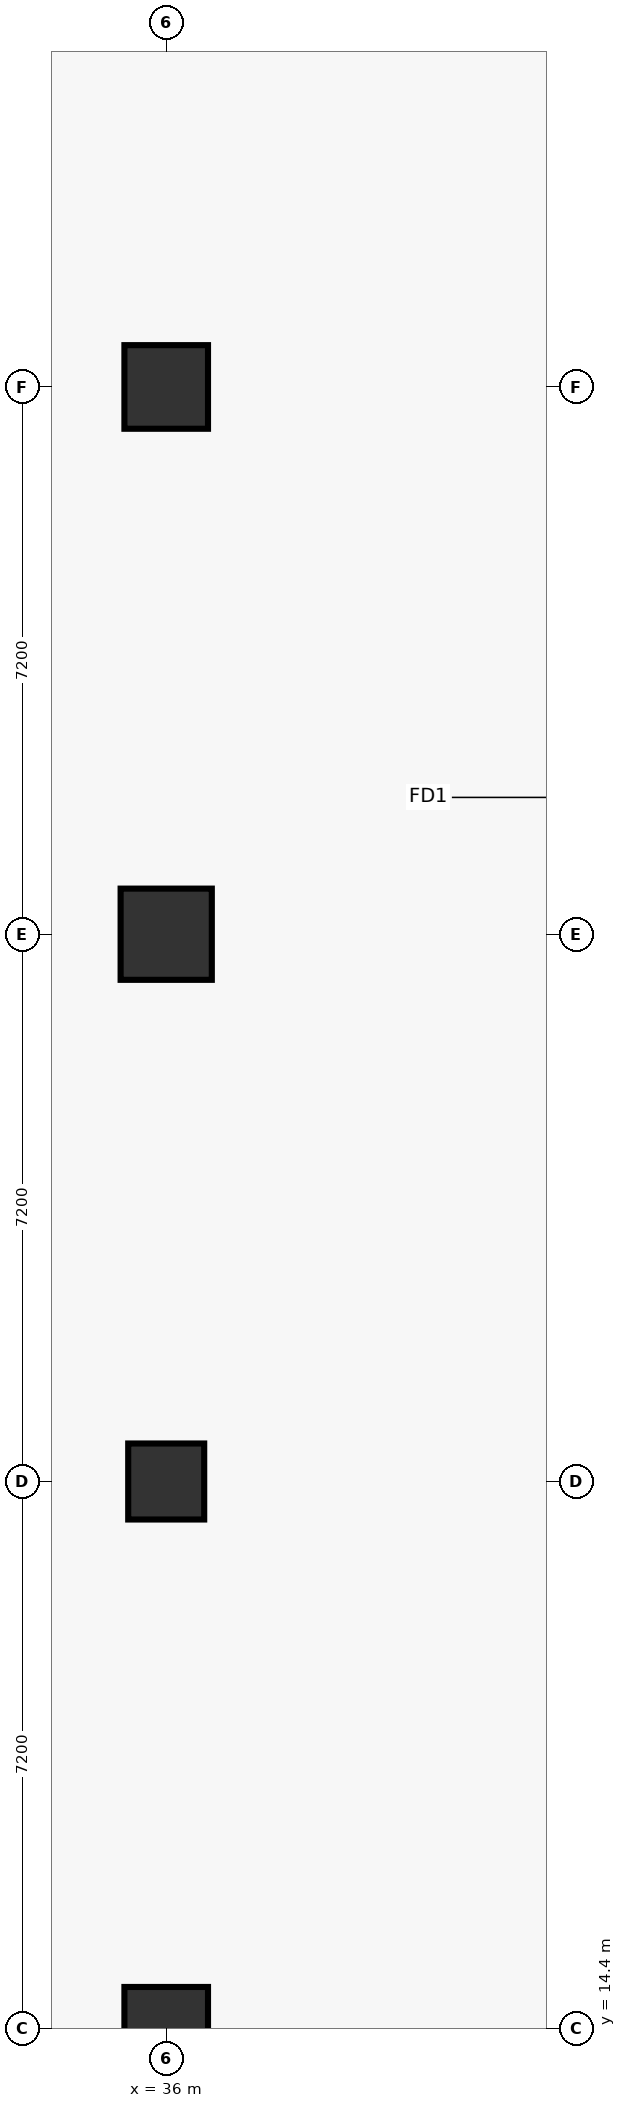
"""IFC4 building model, lengths in metres.
Left out: names, types, materials, properties, quantities, classifications, styles, units other than length and angle.
Written with IfcOpenShell. Run it as: python <this file> out.ifc"""

import sys

from ifc_helpers import new_model, si_unit, direction, frame, origin, origin_2d, place, context, subcontext, project, spatial, rectangle, circle, extrude, element, save


model = new_model("IFC4")
c1 = context("Model", 3, precision=1e-05, world=origin(), true_north=direction((0.0, 1.0)))
c2 = subcontext(c1, "Body", "Model", "MODEL_VIEW")
j1 = project(units=[si_unit("LENGTHUNIT", "METRE"), si_unit("PLANEANGLEUNIT", "RADIAN")], contexts=[c1])
p1 = place(None, origin())
s1 = spatial("IfcSite", under=j1, at=p1, CompositionType="ELEMENT")
p2 = place(p1, origin())
s2 = spatial("IfcBuilding", under=s1, at=p2, CompositionType="ELEMENT")
p3 = place(p2, frame((0.0, 0.0, -5.4)))
s3 = spatial("IfcBuildingStorey", under=s2, at=p3, CompositionType="ELEMENT", Elevation=-5.4)
p4 = place(p3, frame((36.0, 14.4, 0.0), z_axis=(0.0, 0.0, 1.0), x_axis=(1.0, 0.0, 0.0)))
e1 = element("IfcColumn", 1, at=p4, inside=s3, PredefinedType="COLUMN", context=c2, shape_type="SweptSolid", body=[
    extrude(rectangle(XDim=1.1, YDim=1.1, at=origin_2d()), origin(), (0.0, 0.0, 1.0), 5.4),
])
p5 = place(p3, frame((36.0, 21.6, 0.0), z_axis=(0.0, 0.0, 1.0), x_axis=(1.0, 0.0, 0.0)))
e2 = element("IfcColumn", 2, at=p5, inside=s3, PredefinedType="COLUMN", context=c2, shape_type="SweptSolid", body=[
    extrude(rectangle(XDim=1.0, YDim=1.0, at=origin_2d()), origin(), (0.0, 0.0, 1.0), 5.4),
])
p6 = place(p3, frame((36.0, 28.8, 0.0), z_axis=(0.0, 0.0, 1.0), x_axis=(1.0, 0.0, 0.0)))
e3 = element("IfcColumn", 3, at=p6, inside=s3, PredefinedType="COLUMN", context=c2, shape_type="SweptSolid", body=[
    extrude(circle(Radius=0.6, at=origin_2d()), origin(), (0.0, 0.0, 1.0), 5.4),
])
p7 = place(p3, frame((36.0, 36.0, 0.0), z_axis=(0.0, 0.0, 1.0), x_axis=(1.0, 0.0, 0.0)))
e4 = element("IfcColumn", 4, at=p7, inside=s3, PredefinedType="COLUMN", context=c2, shape_type="SweptSolid", body=[
    extrude(rectangle(XDim=1.1, YDim=1.1, at=origin_2d()), origin(), (0.0, 0.0, 1.0), 5.4),
])
save(model, sys.argv[1])
